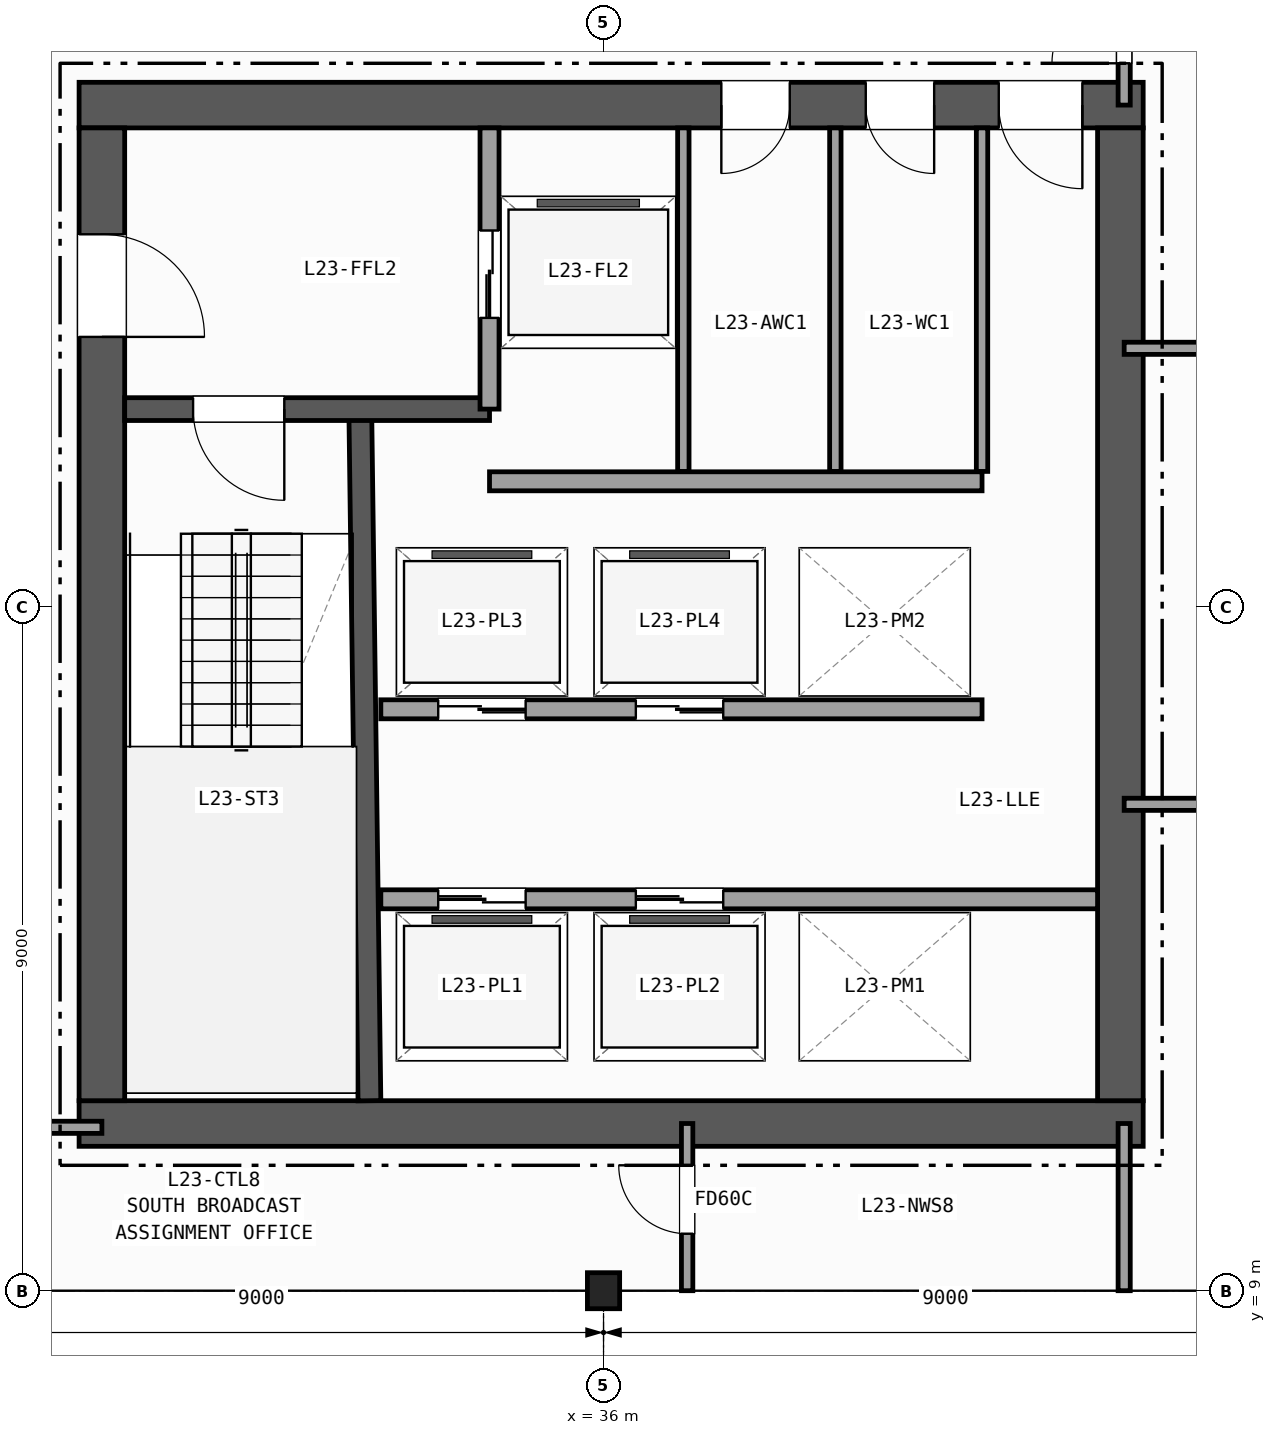
"""IFC4 building model, lengths in metres.
Left out: names, types, materials, properties, quantities, classifications, styles, units other than length and angle.
Written with IfcOpenShell. Run it as: python <this file> out.ifc"""

import sys

from ifc_helpers import new_model, si_unit, direction, frame, frame_2d, origin, origin_2d, place, context, subcontext, project, spatial, rectangle, i_section, extrude, element, fill, save


model = new_model("IFC4")
c1 = context("Model", 3, precision=1e-05, world=origin(), true_north=direction((0.0, 1.0)))
c2 = subcontext(c1, "Body", "Model", "MODEL_VIEW")
j1 = project(units=[si_unit("LENGTHUNIT", "METRE"), si_unit("PLANEANGLEUNIT", "RADIAN")], contexts=[c1])
p1 = place(None, origin())
s1 = spatial("IfcSite", under=j1, at=p1, CompositionType="ELEMENT")
p2 = place(p1, origin())
s2 = spatial("IfcBuilding", under=s1, at=p2, CompositionType="ELEMENT")
p3 = place(p2, frame((0.0, 0.0, 96.5)))
s3 = spatial("IfcBuildingStorey", under=s2, at=p3, CompositionType="ELEMENT", Elevation=96.5)
p4 = place(p3, frame((36.0, 9.0, 0.0), z_axis=(0.0, 0.0, 1.0), x_axis=(1.0, 0.0, 0.0)))
e1 = element("IfcColumn", 1, at=p4, inside=s3, PredefinedType="COLUMN", context=c2, shape_type="SweptSolid", body=[
    extrude(i_section(OverallWidth=0.424, OverallDepth=0.474, WebThickness=0.048, FlangeThickness=0.077, FilletRadius=0.015, at=origin_2d()), origin(), (0.0, 0.0, 1.0), 3.7),
])
p5 = place(p3, frame((29.1, 11.2, 0.0), z_axis=(0.0, 0.0, 1.0), x_axis=(1.0, 0.0, 0.0)))
e2 = element("IfcWall", 2, at=p5, inside=s3, PredefinedType="SHEAR", context=c2, shape_type="SweptSolid", body=[
    extrude(rectangle(XDim=14.0, YDim=0.6, at=frame_2d((7.0, 0.0))), origin(), (0.0, 0.0, 1.0), 3.37),
])
p6 = place(p3, frame((43.1, 24.6, 0.0), z_axis=(0.0, 0.0, 1.0), x_axis=(-1.0, 0.0, 0.0)))
e3 = element("IfcWall", 3, at=p6, inside=s3, PredefinedType="SHEAR", context=c2, shape_type="SweptSolid", body=[
    extrude(rectangle(XDim=14.0, YDim=0.6, at=frame_2d((7.0, 0.0))), origin(), (0.0, 0.0, 1.0), 3.37),
])
p7 = place(p6, frame((0.8, 0.0, 0.0)))
e4 = element("IfcOpeningElement", 4, at=p7, cuts=e3, PredefinedType="OPENING", context=c2, shape_type="SweptSolid", body=[
    extrude(rectangle(XDim=1.1, YDim=2.15, at=frame_2d((0.55, 1.075))), frame((0.0, 0.31, 0.0), z_axis=(0.0, -1.0, 0.0), x_axis=(1.0, 0.0, 0.0)), (0.0, 0.0, 1.0), 0.62),
])
p8 = place(p6, frame((2.75, 0.0, 0.0)))
e5 = element("IfcOpeningElement", 5, at=p8, cuts=e3, PredefinedType="OPENING", context=c2, shape_type="SweptSolid", body=[
    extrude(rectangle(XDim=0.9, YDim=2.1, at=frame_2d((0.45, 1.05))), frame((0.0, 0.31, 0.0), z_axis=(0.0, -1.0, 0.0), x_axis=(1.0, 0.0, 0.0)), (0.0, 0.0, 1.0), 0.62),
])
p9 = place(p6, frame((4.65, 0.0, 0.0)))
e6 = element("IfcOpeningElement", 6, at=p9, cuts=e3, PredefinedType="OPENING", context=c2, shape_type="SweptSolid", body=[
    extrude(rectangle(XDim=0.9, YDim=2.1, at=frame_2d((0.45, 1.05))), frame((0.0, 0.31, 0.0), z_axis=(0.0, -1.0, 0.0), x_axis=(1.0, 0.0, 0.0)), (0.0, 0.0, 1.0), 0.62),
])
p10 = place(p3, frame((29.4, 24.3, 0.0), z_axis=(0.0, 0.0, 1.0), x_axis=(0.0, -1.0, 0.0)))
e7 = element("IfcWall", 7, at=p10, inside=s3, PredefinedType="SHEAR", context=c2, shape_type="SweptSolid", body=[
    extrude(rectangle(XDim=12.8, YDim=0.6, at=frame_2d((6.4, 0.0))), origin(), (0.0, 0.0, 1.0), 3.37),
])
p11 = place(p10, frame((1.4, 0.0, 0.0)))
e8 = element("IfcOpeningElement", 8, at=p11, cuts=e7, PredefinedType="OPENING", context=c2, shape_type="SweptSolid", body=[
    extrude(rectangle(XDim=1.35, YDim=2.15, at=frame_2d((0.675, 1.075))), frame((0.0, 0.31, 0.0), z_axis=(0.0, -1.0, 0.0), x_axis=(1.0, 0.0, 0.0)), (0.0, 0.0, 1.0), 0.62),
])
p12 = place(p3, frame((42.8, 11.5, 0.0), z_axis=(0.0, 0.0, 1.0), x_axis=(0.0, 1.0, 0.0)))
e9 = element("IfcWall", 9, at=p12, inside=s3, PredefinedType="SHEAR", context=c2, shape_type="SweptSolid", body=[
    extrude(rectangle(XDim=12.8, YDim=0.6, at=frame_2d((6.4, 0.0))), origin(), (0.0, 0.0, 1.0), 3.37),
])
p13 = place(p3, frame((32.92, 11.5, 0.0), z_axis=(0.0, 0.0, 1.0), x_axis=(-0.013244407292, 0.999912288991, 0.0)))
e10 = element("IfcWall", 10, at=p13, inside=s3, PredefinedType="SHEAR", context=c2, shape_type="SweptSolid", body=[
    extrude(rectangle(XDim=9.051, YDim=0.3, at=frame_2d((4.525, 0.0))), origin(), (0.0, 0.0, 1.0), 3.37),
])
p14 = place(p3, frame((34.5, 20.6, 0.0), z_axis=(0.0, 0.0, 1.0), x_axis=(-1.0, 0.0, 0.0)))
e11 = element("IfcWall", 11, at=p14, inside=s3, PredefinedType="SHEAR", context=c2, shape_type="SweptSolid", body=[
    extrude(rectangle(XDim=4.8, YDim=0.3, at=frame_2d((2.4, 0.0))), origin(), (0.0, 0.0, 1.0), 3.37),
])
p15 = place(p14, frame((2.7, 0.0, 0.0)))
e12 = element("IfcOpeningElement", 12, at=p15, cuts=e11, PredefinedType="OPENING", context=c2, shape_type="SweptSolid", body=[
    extrude(rectangle(XDim=1.2, YDim=2.15, at=frame_2d((0.6, 1.075))), frame((0.0, 0.16, 0.0), z_axis=(0.0, -1.0, 0.0), x_axis=(1.0, 0.0, 0.0)), (0.0, 0.0, 1.0), 0.32),
])
p16 = place(p3, frame((34.5, 20.6, 0.0), z_axis=(0.0, 0.0, 1.0), x_axis=(0.0, 1.0, 0.0)))
e13 = element("IfcWall", 13, at=p16, inside=s3, PredefinedType="PARTITIONING", context=c2, shape_type="SweptSolid", body=[
    extrude(rectangle(XDim=3.7, YDim=0.25, at=frame_2d((1.85, 0.0))), origin(), (0.0, 0.0, 1.0), 3.37),
])
p17 = place(p16, frame((1.2, 0.0, 0.0)))
e14 = element("IfcOpeningElement", 14, at=p17, cuts=e13, PredefinedType="OPENING", context=c2, shape_type="SweptSolid", body=[
    extrude(rectangle(XDim=1.15, YDim=2.15, at=frame_2d((0.575, 1.075))), frame((0.0, 0.135, 0.0), z_axis=(0.0, -1.0, 0.0), x_axis=(1.0, 0.0, 0.0)), (0.0, 0.0, 1.0), 0.27),
])
p18 = place(p3, frame((34.5, 19.65, 0.0), z_axis=(0.0, 0.0, 1.0), x_axis=(1.0, 0.0, 0.0)))
e15 = element("IfcWall", 15, at=p18, inside=s3, PredefinedType="PARTITIONING", context=c2, shape_type="SweptSolid", body=[
    extrude(rectangle(XDim=6.48, YDim=0.25, at=frame_2d((3.24, 0.0))), origin(), (0.0, 0.0, 1.0), 3.37),
])
p19 = place(p3, frame((33.07, 14.15, 0.0), z_axis=(0.0, 0.0, 1.0), x_axis=(1.0, 0.0, 0.0)))
e16 = element("IfcWall", 16, at=p19, inside=s3, PredefinedType="PARTITIONING", context=c2, shape_type="SweptSolid", body=[
    extrude(rectangle(XDim=9.43, YDim=0.25, at=frame_2d((4.715, 0.0))), origin(), (0.0, 0.0, 1.0), 3.37),
])
p20 = place(p19, frame((0.755, 0.0, 0.0)))
e17 = element("IfcOpeningElement", 17, at=p20, cuts=e16, PredefinedType="OPENING", context=c2, shape_type="SweptSolid", body=[
    extrude(rectangle(XDim=1.15, YDim=2.15, at=frame_2d((0.575, 1.075))), frame((0.0, 0.135, 0.0), z_axis=(0.0, -1.0, 0.0), x_axis=(1.0, 0.0, 0.0)), (0.0, 0.0, 1.0), 0.27),
])
p21 = place(p19, frame((3.355, 0.0, 0.0)))
e18 = element("IfcOpeningElement", 18, at=p21, cuts=e16, PredefinedType="OPENING", context=c2, shape_type="SweptSolid", body=[
    extrude(rectangle(XDim=1.15, YDim=2.15, at=frame_2d((0.575, 1.075))), frame((0.0, 0.135, 0.0), z_axis=(0.0, -1.0, 0.0), x_axis=(1.0, 0.0, 0.0)), (0.0, 0.0, 1.0), 0.27),
])
p22 = place(p3, frame((40.98, 16.65, 0.0), z_axis=(0.0, 0.0, 1.0), x_axis=(-1.0, 0.0, 0.0)))
e19 = element("IfcWall", 19, at=p22, inside=s3, PredefinedType="PARTITIONING", context=c2, shape_type="SweptSolid", body=[
    extrude(rectangle(XDim=7.91, YDim=0.25, at=frame_2d((3.955, 0.0))), origin(), (0.0, 0.0, 1.0), 3.37),
])
p23 = place(p22, frame((6.005, 0.0, 0.0)))
e20 = element("IfcOpeningElement", 20, at=p23, cuts=e19, PredefinedType="OPENING", context=c2, shape_type="SweptSolid", body=[
    extrude(rectangle(XDim=1.15, YDim=2.15, at=frame_2d((0.575, 1.075))), frame((0.0, 0.135, 0.0), z_axis=(0.0, -1.0, 0.0), x_axis=(1.0, 0.0, 0.0)), (0.0, 0.0, 1.0), 0.27),
])
p24 = place(p22, frame((3.405, 0.0, 0.0)))
e21 = element("IfcOpeningElement", 21, at=p24, cuts=e19, PredefinedType="OPENING", context=c2, shape_type="SweptSolid", body=[
    extrude(rectangle(XDim=1.15, YDim=2.15, at=frame_2d((0.575, 1.075))), frame((0.0, 0.135, 0.0), z_axis=(0.0, -1.0, 0.0), x_axis=(1.0, 0.0, 0.0)), (0.0, 0.0, 1.0), 0.27),
])
for number, where, z_axis, x_axis in (
    (22, (37.05, 19.78, 0.0), (0.0, 0.0, 1.0), (0.0, 1.0, 0.0)),
    (23, (39.05, 19.78, 0.0), (0.0, 0.0, 1.0), (0.0, 1.0, 0.0)),
    (24, (40.98, 19.78, 0.0), (0.0, 0.0, 1.0), (0.0, 1.0, 0.0)),
):
    element("IfcWall", number, at=place(p3, frame(where, z_axis=z_axis, x_axis=x_axis)), inside=s3, PredefinedType="PARTITIONING", context=c2, shape_type="SweptSolid", body=[
        extrude(rectangle(XDim=4.52, YDim=0.15, at=frame_2d((2.26, 0.0))), origin(), (0.0, 0.0, 1.0), 3.37),
    ])
p25 = place(p3, frame((24.65, 11.15, 0.0), z_axis=(0.0, 0.0, 1.0), x_axis=(1.0, 0.0, 0.0)))
e25 = element("IfcWall", 25, at=p25, inside=s3, PredefinedType="PARTITIONING", context=c2, shape_type="SweptSolid", body=[
    extrude(rectangle(XDim=4.75, YDim=0.16, at=frame_2d((2.375, 0.0))), origin(), (0.0, 0.0, 1.0), 2.742),
])
p26 = place(p25, frame((1.2, 0.0, 0.0)))
e26 = element("IfcOpeningElement", 26, at=p26, cuts=e25, PredefinedType="OPENING", context=c2, shape_type="SweptSolid", body=[
    extrude(rectangle(XDim=1.2, YDim=2.15, at=frame_2d((0.6, 1.075))), frame((0.0, 0.09, 0.0), z_axis=(0.0, -1.0, 0.0), x_axis=(1.0, 0.0, 0.0)), (0.0, 0.0, 1.0), 0.18),
])
p27 = place(p3, frame((37.1, 9.0, 0.0), z_axis=(0.0, 0.0, 1.0), x_axis=(0.0, 1.0, 0.0)))
e27 = element("IfcWall", 27, at=p27, inside=s3, PredefinedType="PARTITIONING", context=c2, shape_type="SweptSolid", body=[
    extrude(rectangle(XDim=2.2, YDim=0.15, at=frame_2d((1.1, 0.0))), origin(), (0.0, 0.0, 1.0), 2.577),
])
p28 = place(p27, frame((0.75, 0.0, 0.0)))
e28 = element("IfcOpeningElement", 28, at=p28, cuts=e27, PredefinedType="OPENING", context=c2, shape_type="SweptSolid", body=[
    extrude(rectangle(XDim=0.9, YDim=2.1, at=frame_2d((0.45, 1.05))), frame((0.0, 0.085, 0.0), z_axis=(0.0, -1.0, 0.0), x_axis=(1.0, 0.0, 0.0)), (0.0, 0.0, 1.0), 0.17),
])
p29 = place(p3, frame((42.85, 9.0, 0.0), z_axis=(0.0, 0.0, 1.0), x_axis=(0.0, 1.0, 0.0)))
e29 = element("IfcWall", 29, at=p29, inside=s3, PredefinedType="PARTITIONING", context=c2, shape_type="SweptSolid", body=[
    extrude(rectangle(XDim=2.2, YDim=0.16, at=frame_2d((1.1, 0.0))), origin(), (0.0, 0.0, 1.0), 2.577),
])
p30 = place(p3, frame((42.85, 24.6, 0.0), z_axis=(0.0, 0.0, 1.0), x_axis=(0.0, 1.0, 0.0)))
e30 = element("IfcWall", 30, at=p30, inside=s3, PredefinedType="PARTITIONING", context=c2, shape_type="SweptSolid", body=[
    extrude(rectangle(XDim=2.4, YDim=0.16, at=frame_2d((1.2, 0.0))), origin(), (0.0, 0.0, 1.0), 2.577),
])
p31 = place(p30, frame((0.55, 0.0, 0.0)))
e31 = element("IfcOpeningElement", 31, at=p31, cuts=e30, PredefinedType="OPENING", context=c2, shape_type="SweptSolid", body=[
    extrude(rectangle(XDim=0.95, YDim=2.1, at=frame_2d((0.475, 1.05))), frame((0.0, 0.09, 0.0), z_axis=(0.0, -1.0, 0.0), x_axis=(1.0, 0.0, 0.0)), (0.0, 0.0, 1.0), 0.18),
])
p32 = place(p3, frame((42.85, 15.4, 0.0), z_axis=(0.0, 0.0, 1.0), x_axis=(1.0, 0.0, 0.0)))
e32 = element("IfcWall", 32, at=p32, inside=s3, PredefinedType="PARTITIONING", context=c2, shape_type="SweptSolid", body=[
    extrude(rectangle(XDim=20.582, YDim=0.16, at=frame_2d((10.291, 0.0))), origin(), (0.0, 0.0, 1.0), 3.37),
])
p33 = place(p32, frame((3.4, 0.0, 0.0)))
e33 = element("IfcOpeningElement", 33, at=p33, cuts=e32, PredefinedType="OPENING", context=c2, shape_type="SweptSolid", body=[
    extrude(rectangle(XDim=1.0, YDim=2.1, at=frame_2d((0.5, 1.05))), frame((0.0, 0.09, 0.0), z_axis=(0.0, -1.0, 0.0), x_axis=(1.0, 0.0, 0.0)), (0.0, 0.0, 1.0), 0.18),
])
p34 = place(p3, frame((42.85, 21.4, 0.0), z_axis=(0.0, 0.0, 1.0), x_axis=(1.0, 0.0, 0.0)))
e34 = element("IfcWall", 34, at=p34, inside=s3, PredefinedType="PARTITIONING", context=c2, shape_type="SweptSolid", body=[
    extrude(rectangle(XDim=20.5, YDim=0.16, at=frame_2d((10.25, 0.0))), origin(), (0.0, 0.0, 1.0), 3.37),
])
p35 = place(p34, frame((3.4, 0.0, 0.0)))
e35 = element("IfcOpeningElement", 35, at=p35, cuts=e34, PredefinedType="OPENING", context=c2, shape_type="SweptSolid", body=[
    extrude(rectangle(XDim=1.05, YDim=2.15, at=frame_2d((0.525, 1.075))), frame((0.0, 0.09, 0.0), z_axis=(0.0, -1.0, 0.0), x_axis=(1.0, 0.0, 0.0)), (0.0, 0.0, 1.0), 0.18),
])
p36 = place(p15, origin())
e36 = element("IfcDoor", 36, at=p36, inside=s3, OperationType="SINGLE_SWING_LEFT", PredefinedType="DOOR", context=c2, shape_type="SweptSolid", body=[
    extrude(rectangle(XDim=1.2, YDim=2.15, at=frame_2d((0.6, 1.075))), frame((0.0, 0.025, 0.0), z_axis=(0.0, -1.0, 0.0), x_axis=(1.0, 0.0, 0.0)), (0.0, 0.0, 1.0), 0.05),
])
fill(e12, e36)
p37 = place(p11, origin())
e37 = element("IfcDoor", 37, at=p37, inside=s3, OperationType="SINGLE_SWING_RIGHT", PredefinedType="DOOR", context=c2, shape_type="SweptSolid", body=[
    extrude(rectangle(XDim=1.35, YDim=2.15, at=frame_2d((0.675, 1.075))), frame((0.0, 0.025, 0.0), z_axis=(0.0, -1.0, 0.0), x_axis=(1.0, 0.0, 0.0)), (0.0, 0.0, 1.0), 0.05),
])
fill(e8, e37)
p38 = place(p7, origin())
e38 = element("IfcDoor", 38, at=p38, inside=s3, OperationType="SINGLE_SWING_LEFT", PredefinedType="DOOR", context=c2, shape_type="SweptSolid", body=[
    extrude(rectangle(XDim=1.1, YDim=2.15, at=frame_2d((0.55, 1.075))), frame((0.0, 0.025, 0.0), z_axis=(0.0, -1.0, 0.0), x_axis=(1.0, 0.0, 0.0)), (0.0, 0.0, 1.0), 0.05),
])
fill(e4, e38)
p39 = place(p8, origin())
e39 = element("IfcDoor", 39, at=p39, inside=s3, OperationType="SINGLE_SWING_LEFT", PredefinedType="DOOR", context=c2, shape_type="SweptSolid", body=[
    extrude(rectangle(XDim=0.9, YDim=2.1, at=frame_2d((0.45, 1.05))), frame((0.0, 0.025, 0.0), z_axis=(0.0, -1.0, 0.0), x_axis=(1.0, 0.0, 0.0)), (0.0, 0.0, 1.0), 0.05),
])
fill(e5, e39)
p40 = place(p9, origin())
e40 = element("IfcDoor", 40, at=p40, inside=s3, OperationType="SINGLE_SWING_RIGHT", PredefinedType="DOOR", context=c2, shape_type="SweptSolid", body=[
    extrude(rectangle(XDim=0.9, YDim=2.1, at=frame_2d((0.45, 1.05))), frame((0.0, 0.025, 0.0), z_axis=(0.0, -1.0, 0.0), x_axis=(1.0, 0.0, 0.0)), (0.0, 0.0, 1.0), 0.05),
])
fill(e6, e40)
p41 = place(p17, origin())
e41 = element("IfcDoor", 41, at=p41, inside=s3, OperationType="DOUBLE_DOOR_SLIDING", PredefinedType="DOOR", context=c2, shape_type="SweptSolid", body=[
    extrude(rectangle(XDim=1.15, YDim=2.15, at=frame_2d((0.575, 1.075))), frame((0.0, 0.025, 0.0), z_axis=(0.0, -1.0, 0.0), x_axis=(1.0, 0.0, 0.0)), (0.0, 0.0, 1.0), 0.05),
])
fill(e14, e41)
p42 = place(p20, origin())
e42 = element("IfcDoor", 42, at=p42, inside=s3, OperationType="DOUBLE_DOOR_SLIDING", PredefinedType="DOOR", context=c2, shape_type="SweptSolid", body=[
    extrude(rectangle(XDim=1.15, YDim=2.15, at=frame_2d((0.575, 1.075))), frame((0.0, 0.025, 0.0), z_axis=(0.0, -1.0, 0.0), x_axis=(1.0, 0.0, 0.0)), (0.0, 0.0, 1.0), 0.05),
])
fill(e17, e42)
p43 = place(p21, origin())
e43 = element("IfcDoor", 43, at=p43, inside=s3, OperationType="DOUBLE_DOOR_SLIDING", PredefinedType="DOOR", context=c2, shape_type="SweptSolid", body=[
    extrude(rectangle(XDim=1.15, YDim=2.15, at=frame_2d((0.575, 1.075))), frame((0.0, 0.025, 0.0), z_axis=(0.0, -1.0, 0.0), x_axis=(1.0, 0.0, 0.0)), (0.0, 0.0, 1.0), 0.05),
])
fill(e18, e43)
p44 = place(p23, origin())
e44 = element("IfcDoor", 44, at=p44, inside=s3, OperationType="DOUBLE_DOOR_SLIDING", PredefinedType="DOOR", context=c2, shape_type="SweptSolid", body=[
    extrude(rectangle(XDim=1.15, YDim=2.15, at=frame_2d((0.575, 1.075))), frame((0.0, 0.025, 0.0), z_axis=(0.0, -1.0, 0.0), x_axis=(1.0, 0.0, 0.0)), (0.0, 0.0, 1.0), 0.05),
])
fill(e20, e44)
p45 = place(p24, origin())
e45 = element("IfcDoor", 45, at=p45, inside=s3, OperationType="DOUBLE_DOOR_SLIDING", PredefinedType="DOOR", context=c2, shape_type="SweptSolid", body=[
    extrude(rectangle(XDim=1.15, YDim=2.15, at=frame_2d((0.575, 1.075))), frame((0.0, 0.025, 0.0), z_axis=(0.0, -1.0, 0.0), x_axis=(1.0, 0.0, 0.0)), (0.0, 0.0, 1.0), 0.05),
])
fill(e21, e45)
p46 = place(p28, origin())
e46 = element("IfcDoor", 46, at=p46, inside=s3, OperationType="SINGLE_SWING_RIGHT", PredefinedType="DOOR", context=c2, shape_type="SweptSolid", body=[
    extrude(rectangle(XDim=0.9, YDim=2.1, at=frame_2d((0.45, 1.05))), frame((0.0, 0.025, 0.0), z_axis=(0.0, -1.0, 0.0), x_axis=(1.0, 0.0, 0.0)), (0.0, 0.0, 1.0), 0.05),
])
fill(e28, e46)
p47 = place(p31, origin())
e47 = element("IfcDoor", 47, at=p47, inside=s3, OperationType="SINGLE_SWING_LEFT", PredefinedType="DOOR", context=c2, shape_type="SweptSolid", body=[
    extrude(rectangle(XDim=0.95, YDim=2.1, at=frame_2d((0.475, 1.05))), frame((0.0, 0.025, 0.0), z_axis=(0.0, -1.0, 0.0), x_axis=(1.0, 0.0, 0.0)), (0.0, 0.0, 1.0), 0.05),
])
fill(e31, e47)
save(model, sys.argv[1])
